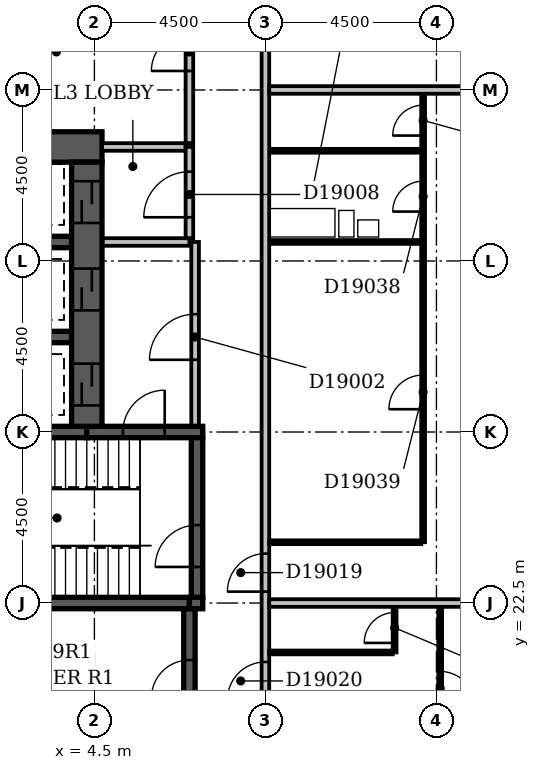
"""IFC4 building model, lengths in metres.
Left out: names, types, materials, properties, quantities, classifications, styles, units other than length and angle.
Written with IfcOpenShell. Run it as: python <this file> out.ifc"""

import sys

from ifc_helpers import new_model, si_unit, direction, frame, frame_2d, origin, place, context, subcontext, project, spatial, rectangle, extrude, element, fill, save


model = new_model("IFC4")
c1 = context("Model", 3, precision=1e-05, world=origin(), true_north=direction((0.0, 1.0)))
c2 = subcontext(c1, "Body", "Model", "MODEL_VIEW")
j1 = project(units=[si_unit("LENGTHUNIT", "METRE"), si_unit("PLANEANGLEUNIT", "RADIAN")], contexts=[c1])
p1 = place(None, origin())
s1 = spatial("IfcSite", under=j1, at=p1, CompositionType="ELEMENT")
p2 = place(p1, origin())
s2 = spatial("IfcBuilding", under=s1, at=p2, CompositionType="ELEMENT")
p3 = place(p2, frame((0.0, 0.0, 79.4)))
s3 = spatial("IfcBuildingStorey", under=s2, at=p3, CompositionType="ELEMENT", Elevation=79.4)
p4 = place(p3, frame((0.1, 34.5, -0.3), z_axis=(0.0, 0.0, 1.0), x_axis=(1.0, 0.0, 0.0)))
e1 = element("IfcWall", 1, at=p4, inside=s3, PredefinedType="SHEAR", context=c2, shape_type="SweptSolid", body=[
    extrude(rectangle(XDim=4.6, YDim=0.8, at=frame_2d((2.3, 0.0))), origin(), (0.0, 0.0, 1.0), 3.6),
])
p5 = place(p3, frame((0.35, 22.5, -0.3), z_axis=(0.0, 0.0, 1.0), x_axis=(1.0, 0.0, 0.0)))
e2 = element("IfcWall", 2, at=p5, inside=s3, PredefinedType="SHEAR", context=c2, shape_type="SweptSolid", body=[
    extrude(rectangle(XDim=6.65, YDim=0.3, at=frame_2d((3.325, 0.0))), origin(), (0.0, 0.0, 1.0), 3.6),
])
p6 = place(p3, frame((0.35, 27.0, -0.3), z_axis=(0.0, 0.0, 1.0), x_axis=(1.0, 0.0, 0.0)))
e3 = element("IfcWall", 3, at=p6, inside=s3, PredefinedType="SHEAR", context=c2, shape_type="SweptSolid", body=[
    extrude(rectangle(XDim=3.95, YDim=0.3, at=frame_2d((1.975, 0.0))), origin(), (0.0, 0.0, 1.0), 3.6),
])
for number, where, z_axis, x_axis in (
    (4, (0.9, 29.5, -0.3), (0.0, 0.0, 1.0), (1.0, 0.0, 0.0)),
    (5, (0.9, 32.0, -0.3), (0.0, 0.0, 1.0), (1.0, 0.0, 0.0)),
):
    element("IfcWall", number, at=place(p3, frame(where, z_axis=z_axis, x_axis=x_axis)), inside=s3, PredefinedType="SHEAR", context=c2, shape_type="SweptSolid", body=[
        extrude(rectangle(XDim=3.0, YDim=0.3, at=frame_2d((1.5, 0.0))), origin(), (0.0, 0.0, 1.0), 3.6),
    ])
p7 = place(p3, frame((4.3, 27.0, -0.3), z_axis=(0.0, 0.0, 1.0), x_axis=(1.0, 0.0, 0.0)))
e6 = element("IfcWall", 6, at=p7, inside=s3, PredefinedType="SHEAR", context=c2, shape_type="SweptSolid", body=[
    extrude(rectangle(XDim=3.05, YDim=0.3, at=frame_2d((1.525, 0.0))), origin(), (0.0, 0.0, 1.0), 3.6),
])
p8 = place(p7, frame((0.95, 0.0, 0.3)))
e7 = element("IfcOpeningElement", 7, at=p8, cuts=e6, PredefinedType="OPENING", context=c2, shape_type="SweptSolid", body=[
    extrude(rectangle(XDim=1.1, YDim=2.1, at=frame_2d((0.55, 1.05))), frame((0.0, 0.162, 0.0), z_axis=(0.0, -1.0, 0.0), x_axis=(1.0, 0.0, 0.0)), (0.0, 0.0, 1.0), 0.324),
])
p9 = place(p3, frame((4.3, 27.15, -0.3), z_axis=(0.0, 0.0, 1.0), x_axis=(0.0, 1.0, 0.0)))
e8 = element("IfcWall", 8, at=p9, inside=s3, PredefinedType="SHEAR", context=c2, shape_type="SweptSolid", body=[
    extrude(rectangle(XDim=6.95, YDim=0.8, at=frame_2d((3.475, 0.0))), origin(), (0.0, 0.0, 1.0), 3.6),
])
p10 = place(p9, frame((3.05, 0.0, 0.3)))
e9 = element("IfcOpeningElement", 9, at=p10, cuts=e8, PredefinedType="OPENING", context=c2, shape_type="SweptSolid", body=[
    extrude(rectangle(XDim=1.1, YDim=2.1, at=frame_2d((0.55, 1.05))), frame((0.0, 0.412, 0.0), z_axis=(0.0, -1.0, 0.0), x_axis=(1.0, 0.0, 0.0)), (0.0, 0.0, 1.0), 0.824),
])
p11 = place(p9, frame((0.55, 0.0, 0.3)))
e10 = element("IfcOpeningElement", 10, at=p11, cuts=e8, PredefinedType="OPENING", context=c2, shape_type="SweptSolid", body=[
    extrude(rectangle(XDim=1.1, YDim=2.1, at=frame_2d((0.55, 1.05))), frame((0.0, 0.412, 0.0), z_axis=(0.0, -1.0, 0.0), x_axis=(1.0, 0.0, 0.0)), (0.0, 0.0, 1.0), 0.824),
])
p12 = place(p9, frame((5.35, 0.0, 0.3)))
e11 = element("IfcOpeningElement", 11, at=p12, cuts=e8, PredefinedType="OPENING", context=c2, shape_type="SweptSolid", body=[
    extrude(rectangle(XDim=1.1, YDim=2.1, at=frame_2d((0.55, 1.05))), frame((0.0, 0.412, 0.0), z_axis=(0.0, -1.0, 0.0), x_axis=(1.0, 0.0, 0.0)), (0.0, 0.0, 1.0), 0.824),
])
p13 = place(p3, frame((7.0, 18.65, -0.3), z_axis=(0.0, 0.0, 1.0), x_axis=(0.0, 1.0, 0.0)))
e12 = element("IfcWall", 12, at=p13, inside=s3, PredefinedType="SHEAR", context=c2, shape_type="SweptSolid", body=[
    extrude(rectangle(XDim=3.7, YDim=0.3, at=frame_2d((1.85, 0.0))), origin(), (0.0, 0.0, 1.0), 3.6),
])
p14 = place(p13, frame((1.35, 0.0, 0.3)))
e13 = element("IfcOpeningElement", 13, at=p14, cuts=e12, PredefinedType="OPENING", context=c2, shape_type="SweptSolid", body=[
    extrude(rectangle(XDim=1.0, YDim=2.1, at=frame_2d((0.5, 1.05))), frame((0.0, 0.162, 0.0), z_axis=(0.0, -1.0, 0.0), x_axis=(1.0, 0.0, 0.0)), (0.0, 0.0, 1.0), 0.324),
])
p15 = place(p3, frame((7.0, 22.5, -0.3), z_axis=(0.0, 0.0, 1.0), x_axis=(1.0, 0.0, 0.0)))
e14 = element("IfcWall", 14, at=p15, inside=s3, PredefinedType="SHEAR", context=c2, shape_type="SweptSolid", body=[
    extrude(rectangle(XDim=0.35, YDim=0.3, at=frame_2d((0.175, 0.0))), origin(), (0.0, 0.0, 1.0), 3.6),
])
p16 = place(p3, frame((7.2, 22.65, -0.3), z_axis=(0.0, 0.0, 1.0), x_axis=(0.0, 1.0, 0.0)))
e15 = element("IfcWall", 15, at=p16, inside=s3, PredefinedType="SHEAR", context=c2, shape_type="SweptSolid", body=[
    extrude(rectangle(XDim=4.2, YDim=0.3, at=frame_2d((2.1, 0.0))), origin(), (0.0, 0.0, 1.0), 3.6),
])
p17 = place(p16, frame((0.8, 0.0, 0.3)))
e16 = element("IfcOpeningElement", 16, at=p17, cuts=e15, PredefinedType="OPENING", context=c2, shape_type="SweptSolid", body=[
    extrude(rectangle(XDim=1.1, YDim=2.1, at=frame_2d((0.55, 1.05))), frame((0.0, 0.162, 0.0), z_axis=(0.0, -1.0, 0.0), x_axis=(1.0, 0.0, 0.0)), (0.0, 0.0, 1.0), 0.324),
])
p18 = place(p3, frame((4.72, 32.0, 0.0), z_axis=(0.0, 0.0, 1.0), x_axis=(1.0, 0.0, 0.0)))
e17 = element("IfcWall", 17, at=p18, inside=s3, PredefinedType="PARTITIONING", context=c2, shape_type="SweptSolid", body=[
    extrude(rectangle(XDim=2.28, YDim=0.2, at=frame_2d((1.14, 0.0))), origin(), (0.0, 0.0, 1.0), 3.3),
])
p19 = place(p3, frame((7.0, 32.1, 0.0), z_axis=(0.0, 0.0, 1.0), x_axis=(0.0, 1.0, 0.0)))
e18 = element("IfcWall", 18, at=p19, inside=s3, PredefinedType="PARTITIONING", context=c2, shape_type="SweptSolid", body=[
    extrude(rectangle(XDim=2.4, YDim=0.2, at=frame_2d((1.2, 0.0))), origin(), (0.0, 0.0, 1.0), 3.3),
])
p20 = place(p19, frame((0.55, 0.0, 0.0)))
e19 = element("IfcOpeningElement", 19, at=p20, cuts=e18, PredefinedType="OPENING", context=c2, shape_type="SweptSolid", body=[
    extrude(rectangle(XDim=1.2, YDim=2.1, at=frame_2d((0.6, 1.05))), frame((0.0, 0.112, 0.0), z_axis=(0.0, -1.0, 0.0), x_axis=(1.0, 0.0, 0.0)), (0.0, 0.0, 1.0), 0.224),
])
p21 = place(p3, frame((4.7, 34.5, 0.0), z_axis=(0.0, 0.0, 1.0), x_axis=(1.0, 0.0, 0.0)))
e20 = element("IfcWall", 20, at=p21, inside=s3, PredefinedType="PARTITIONING", context=c2, shape_type="SweptSolid", body=[
    extrude(rectangle(XDim=2.2, YDim=0.2, at=frame_2d((1.1, 0.0))), origin(), (0.0, 0.0, 1.0), 3.3),
])
p22 = place(p3, frame((7.15, 27.17, 0.0), z_axis=(0.0, 0.0, 1.0), x_axis=(0.0, 1.0, 0.0)))
e21 = element("IfcWall", 21, at=p22, inside=s3, PredefinedType="PARTITIONING", context=c2, shape_type="SweptSolid", body=[
    extrude(rectangle(XDim=4.83, YDim=0.2, at=frame_2d((2.415, 0.0))), origin(), (0.0, 0.0, 1.0), 3.3),
])
p23 = place(p22, frame((1.73, 0.0, 0.0)))
e22 = element("IfcOpeningElement", 22, at=p23, cuts=e21, PredefinedType="OPENING", context=c2, shape_type="SweptSolid", body=[
    extrude(rectangle(XDim=1.2, YDim=2.1, at=frame_2d((0.6, 1.05))), frame((0.0, 0.112, 0.0), z_axis=(0.0, -1.0, 0.0), x_axis=(1.0, 0.0, 0.0)), (0.0, 0.0, 1.0), 0.224),
])
p24 = place(p3, frame((9.0, 5.0, 0.0), z_axis=(0.0, 0.0, 1.0), x_axis=(0.0, 1.0, 0.0)))
e23 = element("IfcWall", 23, at=p24, inside=s3, PredefinedType="PARTITIONING", context=c2, shape_type="SweptSolid", body=[
    extrude(rectangle(XDim=44.5, YDim=0.2, at=frame_2d((22.25, 0.0))), origin(), (0.0, 0.0, 1.0), 3.3),
])
p25 = place(p24, frame((17.8, 0.0, 0.0)))
e24 = element("IfcOpeningElement", 24, at=p25, cuts=e23, PredefinedType="OPENING", context=c2, shape_type="SweptSolid", body=[
    extrude(rectangle(XDim=1.0, YDim=2.1, at=frame_2d((0.5, 1.05))), frame((0.0, 0.112, 0.0), z_axis=(0.0, -1.0, 0.0), x_axis=(1.0, 0.0, 0.0)), (0.0, 0.0, 1.0), 0.224),
])
p26 = place(p24, frame((14.95, 0.0, 0.0)))
e25 = element("IfcOpeningElement", 25, at=p26, cuts=e23, PredefinedType="OPENING", context=c2, shape_type="SweptSolid", body=[
    extrude(rectangle(XDim=1.0, YDim=2.1, at=frame_2d((0.5, 1.05))), frame((0.0, 0.112, 0.0), z_axis=(0.0, -1.0, 0.0), x_axis=(1.0, 0.0, 0.0)), (0.0, 0.0, 1.0), 0.224),
])
p27 = place(p24, frame((10.45, 0.0, 0.0)))
e26 = element("IfcOpeningElement", 26, at=p27, cuts=e23, PredefinedType="OPENING", context=c2, shape_type="SweptSolid", body=[
    extrude(rectangle(XDim=1.0, YDim=2.1, at=frame_2d((0.5, 1.05))), frame((0.0, 0.112, 0.0), z_axis=(0.0, -1.0, 0.0), x_axis=(1.0, 0.0, 0.0)), (0.0, 0.0, 1.0), 0.224),
])
p28 = place(p24, frame((5.95, 0.0, 0.0)))
e27 = element("IfcOpeningElement", 27, at=p28, cuts=e23, PredefinedType="OPENING", context=c2, shape_type="SweptSolid", body=[
    extrude(rectangle(XDim=1.0, YDim=2.1, at=frame_2d((0.5, 1.05))), frame((0.0, 0.112, 0.0), z_axis=(0.0, -1.0, 0.0), x_axis=(1.0, 0.0, 0.0)), (0.0, 0.0, 1.0), 0.224),
])
p29 = place(p24, frame((35.0, 0.0, 0.0)))
e28 = element("IfcOpeningElement", 28, at=p29, cuts=e23, PredefinedType="OPENING", context=c2, shape_type="SweptSolid", body=[
    extrude(rectangle(XDim=0.9, YDim=2.1, at=frame_2d((0.45, 1.05))), frame((0.0, 0.112, 0.0), z_axis=(0.0, -1.0, 0.0), x_axis=(1.0, 0.0, 0.0)), (0.0, 0.0, 1.0), 0.224),
])
p30 = place(p24, frame((1.5, 0.0, 0.0)))
e29 = element("IfcOpeningElement", 29, at=p30, cuts=e23, PredefinedType="OPENING", context=c2, shape_type="SweptSolid", body=[
    extrude(rectangle(XDim=0.9, YDim=2.1, at=frame_2d((0.45, 1.05))), frame((0.0, 0.112, 0.0), z_axis=(0.0, -1.0, 0.0), x_axis=(1.0, 0.0, 0.0)), (0.0, 0.0, 1.0), 0.224),
])
p31 = place(p3, frame((13.6, 18.1, 0.0), z_axis=(0.0, 0.0, 1.0), x_axis=(0.0, 1.0, 0.0)))
e30 = element("IfcWall", 30, at=p31, inside=s3, PredefinedType="PARTITIONING", context=c2, shape_type="SweptSolid", body=[
    extrude(rectangle(XDim=4.3, YDim=0.1, at=frame_2d((2.15, 0.0))), origin(), (0.0, 0.0, 1.0), 3.3),
])
p32 = place(p31, frame((1.7, 0.0, 0.0)))
e31 = element("IfcOpeningElement", 31, at=p32, cuts=e30, PredefinedType="OPENING", context=c2, shape_type="SweptSolid", body=[
    extrude(rectangle(XDim=0.9, YDim=2.1, at=frame_2d((0.45, 1.05))), frame((0.0, 0.062, 0.0), z_axis=(0.0, -1.0, 0.0), x_axis=(1.0, 0.0, 0.0)), (0.0, 0.0, 1.0), 0.124),
])
p33 = place(p3, frame((9.1, 21.2, 0.0), z_axis=(0.0, 0.0, 1.0), x_axis=(1.0, 0.0, 0.0)))
e32 = element("IfcWall", 32, at=p33, inside=s3, PredefinedType="PARTITIONING", context=c2, shape_type="SweptSolid", body=[
    extrude(rectangle(XDim=3.25, YDim=0.1, at=frame_2d((1.625, 0.0))), origin(), (0.0, 0.0, 1.0), 3.3),
])
p34 = place(p3, frame((12.4, 21.2, 0.0), z_axis=(0.0, 0.0, 1.0), x_axis=(0.0, 1.0, 0.0)))
e33 = element("IfcWall", 33, at=p34, inside=s3, PredefinedType="PARTITIONING", context=c2, shape_type="SweptSolid", body=[
    extrude(rectangle(XDim=1.2, YDim=0.1, at=frame_2d((0.6, 0.0))), origin(), (0.0, 0.0, 1.0), 3.3),
])
p35 = place(p34, frame((0.25, 0.0, 0.0)))
e34 = element("IfcOpeningElement", 34, at=p35, cuts=e33, PredefinedType="OPENING", context=c2, shape_type="SweptSolid", body=[
    extrude(rectangle(XDim=0.8, YDim=2.1, at=frame_2d((0.4, 1.05))), frame((0.0, 0.062, 0.0), z_axis=(0.0, -1.0, 0.0), x_axis=(1.0, 0.0, 0.0)), (0.0, 0.0, 1.0), 0.124),
])
p36 = place(p3, frame((9.1, 22.5, 0.0), z_axis=(0.0, 0.0, 1.0), x_axis=(1.0, 0.0, 0.0)))
e35 = element("IfcWall", 35, at=p36, inside=s3, PredefinedType="PARTITIONING", context=c2, shape_type="SweptSolid", body=[
    extrude(rectangle(XDim=12.8, YDim=0.2, at=frame_2d((6.4, 0.0))), origin(), (0.0, 0.0, 1.0), 3.3),
])
p37 = place(p3, frame((9.1, 24.1, 0.0), z_axis=(0.0, 0.0, 1.0), x_axis=(1.0, 0.0, 0.0)))
e36 = element("IfcWall", 36, at=p37, inside=s3, PredefinedType="PARTITIONING", context=c2, shape_type="SweptSolid", body=[
    extrude(rectangle(XDim=4.0, YDim=0.1, at=frame_2d((2.0, 0.0))), origin(), (0.0, 0.0, 1.0), 3.3),
])
p38 = place(p3, frame((13.15, 24.1, 0.0), z_axis=(0.0, 0.0, 1.0), x_axis=(0.0, 1.0, 0.0)))
e37 = element("IfcWall", 37, at=p38, inside=s3, PredefinedType="PARTITIONING", context=c2, shape_type="SweptSolid", body=[
    extrude(rectangle(XDim=11.8, YDim=0.1, at=frame_2d((5.9, 0.0))), origin(), (0.0, 0.0, 1.0), 3.3),
])
p39 = place(p38, frame((8.7, 0.0, 0.0)))
e38 = element("IfcOpeningElement", 38, at=p39, cuts=e37, PredefinedType="OPENING", context=c2, shape_type="SweptSolid", body=[
    extrude(rectangle(XDim=0.8, YDim=2.1, at=frame_2d((0.4, 1.05))), frame((0.0, 0.062, 0.0), z_axis=(0.0, -1.0, 0.0), x_axis=(1.0, 0.0, 0.0)), (0.0, 0.0, 1.0), 0.124),
])
p40 = place(p38, frame((3.5, 0.0, 0.0)))
e39 = element("IfcOpeningElement", 39, at=p40, cuts=e37, PredefinedType="OPENING", context=c2, shape_type="SweptSolid", body=[
    extrude(rectangle(XDim=0.9, YDim=2.1, at=frame_2d((0.45, 1.05))), frame((0.0, 0.062, 0.0), z_axis=(0.0, -1.0, 0.0), x_axis=(1.0, 0.0, 0.0)), (0.0, 0.0, 1.0), 0.124),
])
p41 = place(p38, frame((10.7, 0.0, 0.0)))
e40 = element("IfcOpeningElement", 40, at=p41, cuts=e37, PredefinedType="OPENING", context=c2, shape_type="SweptSolid", body=[
    extrude(rectangle(XDim=0.8, YDim=2.1, at=frame_2d((0.4, 1.05))), frame((0.0, 0.062, 0.0), z_axis=(0.0, -1.0, 0.0), x_axis=(1.0, 0.0, 0.0)), (0.0, 0.0, 1.0), 0.124),
])
for number, where, z_axis, x_axis in (
    (41, (9.1, 32.0, 0.0), (0.0, 0.0, 1.0), (1.0, 0.0, 0.0)),
    (42, (9.1, 34.4, 0.0), (0.0, 0.0, 1.0), (1.0, 0.0, 0.0)),
):
    element("IfcWall", number, at=place(p3, frame(where, z_axis=z_axis, x_axis=x_axis)), inside=s3, PredefinedType="PLUMBINGWALL", context=c2, shape_type="SweptSolid", body=[
        extrude(rectangle(XDim=4.0, YDim=0.1, at=frame_2d((2.0, 0.0))), origin(), (0.0, 0.0, 1.0), 3.3),
    ])
p42 = place(p3, frame((7.0, 34.6, 0.0), z_axis=(0.0, 0.0, 1.0), x_axis=(0.0, 1.0, 0.0)))
e43 = element("IfcWall", 43, at=p42, inside=s3, PredefinedType="PARTITIONING", context=c2, shape_type="SweptSolid", body=[
    extrude(rectangle(XDim=14.8, YDim=0.2, at=frame_2d((7.4, 0.0))), origin(), (0.0, 0.0, 1.0), 3.3),
])
p43 = place(p42, frame((1.9, 0.0, 0.0)))
e44 = element("IfcOpeningElement", 44, at=p43, cuts=e43, PredefinedType="OPENING", context=c2, shape_type="SweptSolid", body=[
    extrude(rectangle(XDim=1.0, YDim=2.1, at=frame_2d((0.5, 1.05))), frame((0.0, 0.112, 0.0), z_axis=(0.0, -1.0, 0.0), x_axis=(1.0, 0.0, 0.0)), (0.0, 0.0, 1.0), 0.224),
])
p44 = place(p42, frame((9.45, 0.0, 0.0)))
e45 = element("IfcOpeningElement", 45, at=p44, cuts=e43, PredefinedType="OPENING", context=c2, shape_type="SweptSolid", body=[
    extrude(rectangle(XDim=0.9, YDim=2.1, at=frame_2d((0.45, 1.05))), frame((0.0, 0.112, 0.0), z_axis=(0.0, -1.0, 0.0), x_axis=(1.0, 0.0, 0.0)), (0.0, 0.0, 1.0), 0.224),
])
p45 = place(p3, frame((9.1, 36.0, 0.0), z_axis=(0.0, 0.0, 1.0), x_axis=(1.0, 0.0, 0.0)))
e46 = element("IfcWall", 46, at=p45, inside=s3, PredefinedType="PARTITIONING", context=c2, shape_type="SweptSolid", body=[
    extrude(rectangle(XDim=12.8, YDim=0.2, at=frame_2d((6.4, 0.0))), origin(), (0.0, 0.0, 1.0), 2.4),
])
p46 = place(p23, origin())
e47 = element("IfcDoor", 47, at=p46, inside=s3, OperationType="SINGLE_SWING_LEFT", PredefinedType="DOOR", context=c2, shape_type="SweptSolid", body=[
    extrude(rectangle(XDim=1.2, YDim=2.1, at=frame_2d((0.6, 1.05))), frame((0.0, 0.025, 0.0), z_axis=(0.0, -1.0, 0.0), x_axis=(1.0, 0.0, 0.0)), (0.0, 0.0, 1.0), 0.05),
])
fill(e22, e47)
p47 = place(p10, origin())
e48 = element("IfcDoor", 48, at=p47, inside=s3, OperationType="SLIDING_TO_LEFT", PredefinedType="DOOR", context=c2, shape_type="SweptSolid", body=[
    extrude(rectangle(XDim=1.1, YDim=2.1, at=frame_2d((0.55, 1.05))), frame((0.0, 0.025, 0.0), z_axis=(0.0, -1.0, 0.0), x_axis=(1.0, 0.0, 0.0)), (0.0, 0.0, 1.0), 0.05),
])
fill(e9, e48)
p48 = place(p11, origin())
e49 = element("IfcDoor", 49, at=p48, inside=s3, OperationType="SLIDING_TO_LEFT", PredefinedType="DOOR", context=c2, shape_type="SweptSolid", body=[
    extrude(rectangle(XDim=1.1, YDim=2.1, at=frame_2d((0.55, 1.05))), frame((0.0, 0.025, 0.0), z_axis=(0.0, -1.0, 0.0), x_axis=(1.0, 0.0, 0.0)), (0.0, 0.0, 1.0), 0.05),
])
fill(e10, e49)
p49 = place(p20, origin())
e50 = element("IfcDoor", 50, at=p49, inside=s3, OperationType="SINGLE_SWING_LEFT", PredefinedType="DOOR", context=c2, shape_type="SweptSolid", body=[
    extrude(rectangle(XDim=1.2, YDim=2.1, at=frame_2d((0.6, 1.05))), frame((0.0, 0.025, 0.0), z_axis=(0.0, -1.0, 0.0), x_axis=(1.0, 0.0, 0.0)), (0.0, 0.0, 1.0), 0.05),
])
fill(e19, e50)
p50 = place(p12, origin())
e51 = element("IfcDoor", 51, at=p50, inside=s3, OperationType="SLIDING_TO_LEFT", PredefinedType="DOOR", context=c2, shape_type="SweptSolid", body=[
    extrude(rectangle(XDim=1.1, YDim=2.1, at=frame_2d((0.55, 1.05))), frame((0.0, 0.025, 0.0), z_axis=(0.0, -1.0, 0.0), x_axis=(1.0, 0.0, 0.0)), (0.0, 0.0, 1.0), 0.05),
])
fill(e11, e51)
p51 = place(p14, origin())
e52 = element("IfcDoor", 52, at=p51, inside=s3, OperationType="SINGLE_SWING_LEFT", PredefinedType="DOOR", context=c2, shape_type="SweptSolid", body=[
    extrude(rectangle(XDim=1.0, YDim=2.1, at=frame_2d((0.5, 1.05))), frame((0.0, 0.025, 0.0), z_axis=(0.0, -1.0, 0.0), x_axis=(1.0, 0.0, 0.0)), (0.0, 0.0, 1.0), 0.05),
])
fill(e13, e52)
p52 = place(p8, frame((1.1, 0.0, 0.0), z_axis=(0.0, 0.0, 1.0), x_axis=(-1.0, 0.0, 0.0)))
e53 = element("IfcDoor", 53, at=p52, inside=s3, OperationType="SINGLE_SWING_LEFT", PredefinedType="DOOR", context=c2, shape_type="SweptSolid", body=[
    extrude(rectangle(XDim=1.1, YDim=2.1, at=frame_2d((0.55, 1.05))), frame((0.0, 0.025, 0.0), z_axis=(0.0, -1.0, 0.0), x_axis=(1.0, 0.0, 0.0)), (0.0, 0.0, 1.0), 0.05),
])
fill(e7, e53)
p53 = place(p17, origin())
e54 = element("IfcDoor", 54, at=p53, inside=s3, OperationType="SINGLE_SWING_LEFT", PredefinedType="DOOR", context=c2, shape_type="SweptSolid", body=[
    extrude(rectangle(XDim=1.1, YDim=2.1, at=frame_2d((0.55, 1.05))), frame((0.0, 0.025, 0.0), z_axis=(0.0, -1.0, 0.0), x_axis=(1.0, 0.0, 0.0)), (0.0, 0.0, 1.0), 0.05),
])
fill(e16, e54)
p54 = place(p25, origin())
e55 = element("IfcDoor", 55, at=p54, inside=s3, OperationType="SINGLE_SWING_LEFT", PredefinedType="DOOR", context=c2, shape_type="SweptSolid", body=[
    extrude(rectangle(XDim=1.0, YDim=2.1, at=frame_2d((0.5, 1.05))), frame((0.0, 0.025, 0.0), z_axis=(0.0, -1.0, 0.0), x_axis=(1.0, 0.0, 0.0)), (0.0, 0.0, 1.0), 0.05),
])
fill(e24, e55)
p55 = place(p26, origin())
e56 = element("IfcDoor", 56, at=p55, inside=s3, OperationType="SINGLE_SWING_LEFT", PredefinedType="DOOR", context=c2, shape_type="SweptSolid", body=[
    extrude(rectangle(XDim=1.0, YDim=2.1, at=frame_2d((0.5, 1.05))), frame((0.0, 0.025, 0.0), z_axis=(0.0, -1.0, 0.0), x_axis=(1.0, 0.0, 0.0)), (0.0, 0.0, 1.0), 0.05),
])
fill(e25, e56)
p56 = place(p32, frame((0.9, 0.0, 0.0), z_axis=(0.0, 0.0, 1.0), x_axis=(-1.0, 0.0, 0.0)))
e57 = element("IfcDoor", 57, at=p56, inside=s3, OperationType="SINGLE_SWING_RIGHT", PredefinedType="DOOR", context=c2, shape_type="SweptSolid", body=[
    extrude(rectangle(XDim=0.9, YDim=2.1, at=frame_2d((0.45, 1.05))), frame((0.0, 0.025, 0.0), z_axis=(0.0, -1.0, 0.0), x_axis=(1.0, 0.0, 0.0)), (0.0, 0.0, 1.0), 0.05),
])
fill(e31, e57)
p57 = place(p35, origin())
e58 = element("IfcDoor", 58, at=p57, inside=s3, OperationType="SINGLE_SWING_LEFT", PredefinedType="DOOR", context=c2, shape_type="SweptSolid", body=[
    extrude(rectangle(XDim=0.8, YDim=2.1, at=frame_2d((0.4, 1.05))), frame((0.0, 0.025, 0.0), z_axis=(0.0, -1.0, 0.0), x_axis=(1.0, 0.0, 0.0)), (0.0, 0.0, 1.0), 0.05),
])
fill(e34, e58)
p58 = place(p39, origin())
e59 = element("IfcDoor", 59, at=p58, inside=s3, OperationType="SINGLE_SWING_LEFT", PredefinedType="DOOR", context=c2, shape_type="SweptSolid", body=[
    extrude(rectangle(XDim=0.8, YDim=2.1, at=frame_2d((0.4, 1.05))), frame((0.0, 0.025, 0.0), z_axis=(0.0, -1.0, 0.0), x_axis=(1.0, 0.0, 0.0)), (0.0, 0.0, 1.0), 0.05),
])
fill(e38, e59)
p59 = place(p40, origin())
e60 = element("IfcDoor", 60, at=p59, inside=s3, OperationType="SINGLE_SWING_LEFT", PredefinedType="DOOR", context=c2, shape_type="SweptSolid", body=[
    extrude(rectangle(XDim=0.9, YDim=2.1, at=frame_2d((0.45, 1.05))), frame((0.0, 0.025, 0.0), z_axis=(0.0, -1.0, 0.0), x_axis=(1.0, 0.0, 0.0)), (0.0, 0.0, 1.0), 0.05),
])
fill(e39, e60)
p60 = place(p41, origin())
e61 = element("IfcDoor", 61, at=p60, inside=s3, OperationType="SINGLE_SWING_LEFT", PredefinedType="DOOR", context=c2, shape_type="SweptSolid", body=[
    extrude(rectangle(XDim=0.8, YDim=2.1, at=frame_2d((0.4, 1.05))), frame((0.0, 0.025, 0.0), z_axis=(0.0, -1.0, 0.0), x_axis=(1.0, 0.0, 0.0)), (0.0, 0.0, 1.0), 0.05),
])
fill(e40, e61)
p61 = place(p43, origin())
e62 = element("IfcDoor", 62, at=p61, inside=s3, OperationType="SINGLE_SWING_LEFT", PredefinedType="DOOR", context=c2, shape_type="SweptSolid", body=[
    extrude(rectangle(XDim=1.0, YDim=2.1, at=frame_2d((0.5, 1.05))), frame((0.0, 0.025, 0.0), z_axis=(0.0, -1.0, 0.0), x_axis=(1.0, 0.0, 0.0)), (0.0, 0.0, 1.0), 0.05),
])
fill(e44, e62)
save(model, sys.argv[1])
